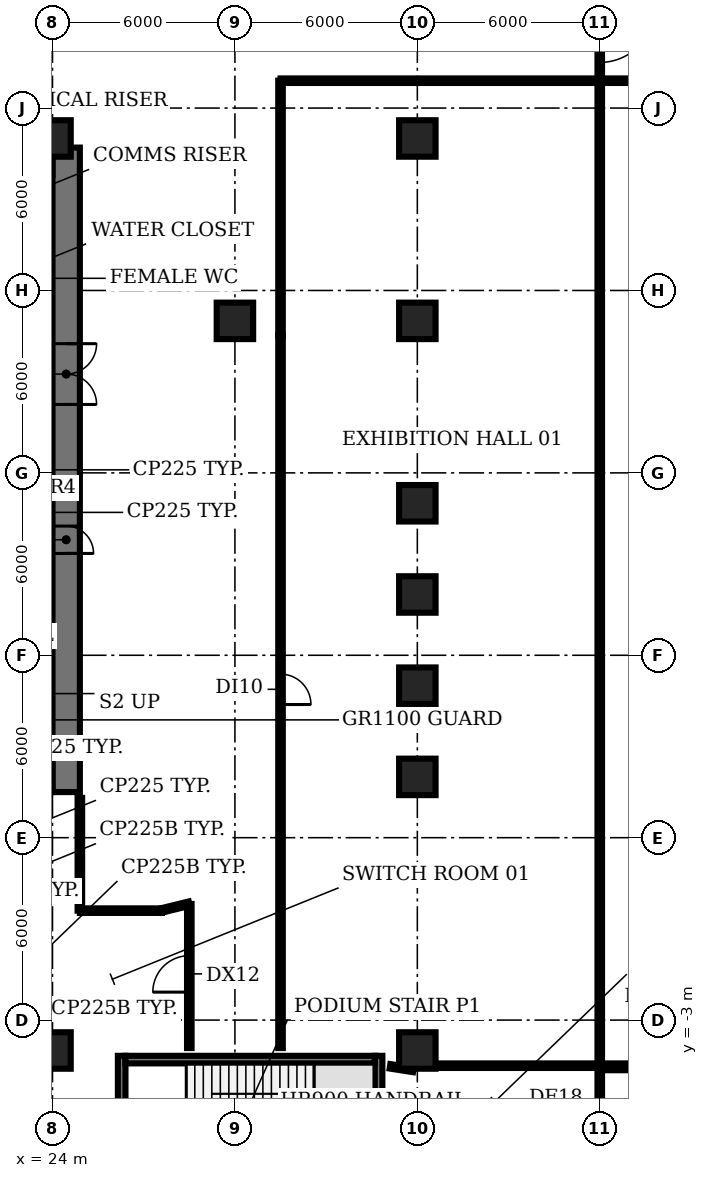
"""IFC4 building model, lengths in metres.
Left out: names, types, materials, properties, quantities, classifications, styles, units other than length and angle.
Written with IfcOpenShell. Run it as: python <this file> out.ifc"""

import sys

from ifc_helpers import new_model, si_unit, direction, frame, frame_2d, origin, origin_2d, place, context, subcontext, project, spatial, rectangle, extrude, element, fill, save


model = new_model("IFC4")
c1 = context("Model", 3, precision=1e-05, world=origin(), true_north=direction((0.0, 1.0)))
c2 = subcontext(c1, "Body", "Model", "MODEL_VIEW")
j1 = project(units=[si_unit("LENGTHUNIT", "METRE"), si_unit("PLANEANGLEUNIT", "RADIAN")], contexts=[c1])
p1 = place(None, origin())
s1 = spatial("IfcSite", under=j1, at=p1, CompositionType="ELEMENT")
p2 = place(p1, origin())
s2 = spatial("IfcBuilding", under=s1, at=p2, CompositionType="ELEMENT")
p3 = place(p2, origin())
s3 = spatial("IfcBuildingStorey", under=s2, at=p3, CompositionType="ELEMENT", Elevation=0.0)
for number, where, z_axis, x_axis in (
    (1, (24.0, -4.0, 0.0), (0.0, 0.0, 1.0), (1.0, 0.0, 0.0)),
    (2, (24.0, 26.0, 0.0), (0.0, 0.0, 1.0), (1.0, 0.0, 0.0)),
    (3, (30.0, 20.0, 0.0), (0.0, 0.0, 1.0), (1.0, 0.0, 0.0)),
    (4, (36.0, -4.0, 0.0), (0.0, 0.0, 1.0), (1.0, 0.0, 0.0)),
    (5, (36.0, 5.0, 0.0), (0.0, 0.0, 1.0), (1.0, 0.0, 0.0)),
    (6, (36.0, 8.0, 0.0), (0.0, 0.0, 1.0), (1.0, 0.0, 0.0)),
    (7, (36.0, 11.0, 0.0), (0.0, 0.0, 1.0), (1.0, 0.0, 0.0)),
    (8, (36.0, 14.0, 0.0), (0.0, 0.0, 1.0), (1.0, 0.0, 0.0)),
    (9, (36.0, 20.0, 0.0), (0.0, 0.0, 1.0), (1.0, 0.0, 0.0)),
    (10, (36.0, 26.0, 0.0), (0.0, 0.0, 1.0), (1.0, 0.0, 0.0)),
):
    element("IfcColumn", number, at=place(p3, frame(where, z_axis=z_axis, x_axis=x_axis)), inside=s3, PredefinedType="COLUMN", context=c2, shape_type="SweptSolid", body=[
        extrude(rectangle(XDim=1.2, YDim=1.2, at=origin_2d()), origin(), (0.0, 0.0, 1.0), 5.65),
    ])
p4 = place(p3, frame((20.85, 11.825, 0.0), z_axis=(0.0, 0.0, 1.0), x_axis=(1.0, 0.0, 0.0)))
e11 = element("IfcWall", 11, at=p4, inside=s3, PredefinedType="SHEAR", context=c2, shape_type="SweptSolid", body=[
    extrude(rectangle(XDim=3.15, YDim=0.25, at=frame_2d((1.575, 0.0))), origin(), (0.0, 0.0, 1.0), 5.65),
])
p5 = place(p3, frame((16.6, 13.7, 0.0), z_axis=(0.0, 0.0, 1.0), x_axis=(1.0, 0.0, 0.0)))
e12 = element("IfcWall", 12, at=p5, inside=s3, PredefinedType="PARTITIONING", context=c2, shape_type="SweptSolid", body=[
    extrude(rectangle(XDim=7.4, YDim=0.225, at=frame_2d((3.7, 0.0))), origin(), (0.0, 0.0, 1.0), 5.65),
])
p6 = place(p3, frame((9.4, 16.5, 0.0), z_axis=(0.0, 0.0, 1.0), x_axis=(1.0, 0.0, 0.0)))
e13 = element("IfcWall", 13, at=p6, inside=s3, PredefinedType="PARTITIONING", context=c2, shape_type="SweptSolid", body=[
    extrude(rectangle(XDim=14.6, YDim=0.225, at=frame_2d((7.3, 0.0))), origin(), (0.0, 0.0, 1.0), 5.65),
])
p7 = place(p6, frame((0.75, 0.0, 0.0)))
e14 = element("IfcOpeningElement", 14, at=p7, cuts=e13, PredefinedType="OPENING", context=c2, shape_type="SweptSolid", body=[
    extrude(rectangle(XDim=1.1, YDim=2.1, at=frame_2d((0.55, 1.05))), frame((0.0, 0.123, 0.0), z_axis=(0.0, -1.0, 0.0), x_axis=(1.0, 0.0, 0.0)), (0.0, 0.0, 1.0), 0.245),
])
p8 = place(p6, frame((3.55, 0.0, 0.0)))
e15 = element("IfcOpeningElement", 15, at=p8, cuts=e13, PredefinedType="OPENING", context=c2, shape_type="SweptSolid", body=[
    extrude(rectangle(XDim=1.1, YDim=2.1, at=frame_2d((0.55, 1.05))), frame((0.0, 0.123, 0.0), z_axis=(0.0, -1.0, 0.0), x_axis=(1.0, 0.0, 0.0)), (0.0, 0.0, 1.0), 0.245),
])
p9 = place(p6, frame((6.35, 0.0, 0.0)))
e16 = element("IfcOpeningElement", 16, at=p9, cuts=e13, PredefinedType="OPENING", context=c2, shape_type="SweptSolid", body=[
    extrude(rectangle(XDim=1.1, YDim=2.1, at=frame_2d((0.55, 1.05))), frame((0.0, 0.123, 0.0), z_axis=(0.0, -1.0, 0.0), x_axis=(1.0, 0.0, 0.0)), (0.0, 0.0, 1.0), 0.245),
])
p10 = place(p6, frame((9.15, 0.0, 0.0)))
e17 = element("IfcOpeningElement", 17, at=p10, cuts=e13, PredefinedType="OPENING", context=c2, shape_type="SweptSolid", body=[
    extrude(rectangle(XDim=1.1, YDim=2.1, at=frame_2d((0.55, 1.05))), frame((0.0, 0.123, 0.0), z_axis=(0.0, -1.0, 0.0), x_axis=(1.0, 0.0, 0.0)), (0.0, 0.0, 1.0), 0.245),
])
p11 = place(p6, frame((12.4, 0.0, 0.0)))
e18 = element("IfcOpeningElement", 18, at=p11, cuts=e13, PredefinedType="OPENING", context=c2, shape_type="SweptSolid", body=[
    extrude(rectangle(XDim=1.0, YDim=2.1, at=frame_2d((0.5, 1.05))), frame((0.0, 0.123, 0.0), z_axis=(0.0, -1.0, 0.0), x_axis=(1.0, 0.0, 0.0)), (0.0, 0.0, 1.0), 0.245),
])
p12 = place(p3, frame((24.0, 20.0, 0.0), z_axis=(0.0, 0.0, 1.0), x_axis=(-1.0, 0.0, 0.0)))
e19 = element("IfcWall", 19, at=p12, inside=s3, PredefinedType="PARTITIONING", context=c2, shape_type="SweptSolid", body=[
    extrude(rectangle(XDim=14.6, YDim=0.225, at=frame_2d((7.3, 0.0))), origin(), (0.0, 0.0, 1.0), 5.65),
])
p13 = place(p12, frame((11.35, 0.0, 0.0)))
e20 = element("IfcOpeningElement", 20, at=p13, cuts=e19, PredefinedType="OPENING", context=c2, shape_type="SweptSolid", body=[
    extrude(rectangle(XDim=1.0, YDim=2.1, at=frame_2d((0.5, 1.05))), frame((0.0, 0.123, 0.0), z_axis=(0.0, -1.0, 0.0), x_axis=(1.0, 0.0, 0.0)), (0.0, 0.0, 1.0), 0.245),
])
p14 = place(p12, frame((5.775, 0.0, 0.0)))
e21 = element("IfcOpeningElement", 21, at=p14, cuts=e19, PredefinedType="OPENING", context=c2, shape_type="SweptSolid", body=[
    extrude(rectangle(XDim=1.0, YDim=2.1, at=frame_2d((0.5, 1.05))), frame((0.0, 0.123, 0.0), z_axis=(0.0, -1.0, 0.0), x_axis=(1.0, 0.0, 0.0)), (0.0, 0.0, 1.0), 0.245),
])
p15 = place(p12, frame((1.2, 0.0, 0.0)))
e22 = element("IfcOpeningElement", 22, at=p15, cuts=e19, PredefinedType="OPENING", context=c2, shape_type="SweptSolid", body=[
    extrude(rectangle(XDim=1.0, YDim=2.1, at=frame_2d((0.5, 1.05))), frame((0.0, 0.123, 0.0), z_axis=(0.0, -1.0, 0.0), x_axis=(1.0, 0.0, 0.0)), (0.0, 0.0, 1.0), 0.245),
])
p16 = place(p3, frame((9.4, 22.8, 0.0), z_axis=(0.0, 0.0, 1.0), x_axis=(1.0, 0.0, 0.0)))
e23 = element("IfcWall", 23, at=p16, inside=s3, PredefinedType="PARTITIONING", context=c2, shape_type="SweptSolid", body=[
    extrude(rectangle(XDim=14.6, YDim=0.225, at=frame_2d((7.3, 0.0))), origin(), (0.0, 0.0, 1.0), 5.65),
])
p17 = place(p3, frame((24.45, 25.7, 0.0), z_axis=(0.0, 0.0, 1.0), x_axis=(0.0, -1.0, 0.0)))
e24 = element("IfcWall", 24, at=p17, inside=s3, PredefinedType="SHEAR", context=c2, shape_type="SweptSolid", body=[
    extrude(rectangle(XDim=21.2, YDim=0.9, at=frame_2d((10.6, 0.0))), origin(), (0.0, 0.0, 1.0), 5.65),
])
p18 = place(p17, frame((12.45, 0.0, 0.0)))
e25 = element("IfcOpeningElement", 25, at=p18, cuts=e24, PredefinedType="OPENING", context=c2, shape_type="SweptSolid", body=[
    extrude(rectangle(XDim=0.9, YDim=2.1, at=frame_2d((0.45, 1.05))), frame((0.0, 0.46, 0.0), z_axis=(0.0, -1.0, 0.0), x_axis=(1.0, 0.0, 0.0)), (0.0, 0.0, 1.0), 0.92),
])
p19 = place(p17, frame((6.45, 0.0, 0.0)))
e26 = element("IfcOpeningElement", 26, at=p19, cuts=e24, PredefinedType="OPENING", context=c2, shape_type="SweptSolid", body=[
    extrude(rectangle(XDim=2.0, YDim=2.1, at=frame_2d((1.0, 1.05))), frame((0.0, 0.46, 0.0), z_axis=(0.0, -1.0, 0.0), x_axis=(1.0, 0.0, 0.0)), (0.0, 0.0, 1.0), 0.92),
])
p20 = place(p3, frame((24.0, 4.95, 0.0), z_axis=(0.0, 0.0, 1.0), x_axis=(-1.0, 0.0, 0.0)))
e27 = element("IfcWall", 27, at=p20, inside=s3, PredefinedType="SHEAR", context=c2, shape_type="SweptSolid", body=[
    extrude(rectangle(XDim=18.0, YDim=0.9, at=frame_2d((9.0, 0.0))), origin(), (0.0, 0.0, 1.0), 5.65),
])
p21 = place(p20, frame((15.675, 0.0, 0.0)))
e28 = element("IfcOpeningElement", 28, at=p21, cuts=e27, PredefinedType="OPENING", context=c2, shape_type="SweptSolid", body=[
    extrude(rectangle(XDim=1.5, YDim=2.1, at=frame_2d((0.75, 1.05))), frame((0.0, 0.46, 0.0), z_axis=(0.0, -1.0, 0.0), x_axis=(1.0, 0.0, 0.0)), (0.0, 0.0, 1.0), 0.92),
])
p22 = place(p20, frame((0.825, 0.0, 0.0)))
e29 = element("IfcOpeningElement", 29, at=p22, cuts=e27, PredefinedType="OPENING", context=c2, shape_type="SweptSolid", body=[
    extrude(rectangle(XDim=1.5, YDim=2.1, at=frame_2d((0.75, 1.05))), frame((0.0, 0.46, 0.0), z_axis=(0.0, -1.0, 0.0), x_axis=(1.0, 0.0, 0.0)), (0.0, 0.0, 1.0), 0.92),
])
p23 = place(p20, frame((13.0, 0.0, 0.0)))
e30 = element("IfcOpeningElement", 30, at=p23, cuts=e27, PredefinedType="OPENING", context=c2, shape_type="SweptSolid", body=[
    extrude(rectangle(XDim=1.2, YDim=2.1, at=frame_2d((0.6, 1.05))), frame((0.0, 0.46, 0.0), z_axis=(0.0, -1.0, 0.0), x_axis=(1.0, 0.0, 0.0)), (0.0, 0.0, 1.0), 0.92),
])
p24 = place(p20, frame((4.9, 0.0, 0.0)))
e31 = element("IfcOpeningElement", 31, at=p24, cuts=e27, PredefinedType="OPENING", context=c2, shape_type="SweptSolid", body=[
    extrude(rectangle(XDim=1.0, YDim=2.1, at=frame_2d((0.5, 1.05))), frame((0.0, 0.46, 0.0), z_axis=(0.0, -1.0, 0.0), x_axis=(1.0, 0.0, 0.0)), (0.0, 0.0, 1.0), 0.92),
])
p25 = place(p3, frame((6.0, 25.25, 0.0), z_axis=(0.0, 0.0, 1.0), x_axis=(1.0, 0.0, 0.0)))
e32 = element("IfcWall", 32, at=p25, inside=s3, PredefinedType="SHEAR", context=c2, shape_type="SweptSolid", body=[
    extrude(rectangle(XDim=18.0, YDim=0.9, at=frame_2d((9.0, 0.0))), origin(), (0.0, 0.0, 1.0), 5.65),
])
for number, where, z_axis, x_axis in (
    (33, (26.275, -8.825, 0.0), (0.0, 0.0, 1.0), (0.0, 1.0, 0.0)),
    (34, (34.725, -8.825, 0.0), (0.0, 0.0, 1.0), (0.0, 1.0, 0.0)),
):
    element("IfcWall", number, at=place(p3, frame(where, z_axis=z_axis, x_axis=x_axis)), inside=s3, PredefinedType="SHEAR", context=c2, shape_type="SweptSolid", body=[
        extrude(rectangle(XDim=4.65, YDim=0.25, at=frame_2d((2.325, 0.0))), origin(), (0.0, 0.0, 1.0), 5.65),
    ])
p26 = place(p3, frame((26.4, -4.3, 0.0), z_axis=(0.0, 0.0, 1.0), x_axis=(1.0, 0.0, 0.0)))
e35 = element("IfcWall", 35, at=p26, inside=s3, PredefinedType="SHEAR", context=c2, shape_type="SweptSolid", body=[
    extrude(rectangle(XDim=8.2, YDim=0.25, at=frame_2d((4.1, 0.0))), origin(), (0.0, 0.0, 1.0), 5.65),
])
p27 = place(p3, frame((24.9, 0.6, 0.0), z_axis=(0.0, 0.0, 1.0), x_axis=(0.0, 1.0, 0.0)))
e36 = element("IfcWall", 36, at=p27, inside=s3, PredefinedType="PARTITIONING", context=c2, shape_type="SweptSolid", body=[
    extrude(rectangle(XDim=3.71, YDim=0.15, at=frame_2d((1.855, 0.0))), origin(), (0.0, 0.0, 1.0), 4.53),
])
p28 = place(p3, frame((24.9, 0.6, 0.0), z_axis=(0.0, 0.0, 1.0), x_axis=(1.0, 0.0, 0.0)))
e37 = element("IfcWall", 37, at=p28, inside=s3, PredefinedType="PARTITIONING", context=c2, shape_type="SweptSolid", body=[
    extrude(rectangle(XDim=2.7, YDim=0.15, at=frame_2d((1.35, 0.0))), origin(), (0.0, 0.0, 1.0), 4.53),
])
p29 = place(p3, frame((27.6, 0.61, 0.0), z_axis=(0.0, 0.0, 1.0), x_axis=(0.971400357327, 0.237447564284, 0.0)))
e38 = element("IfcWall", 38, at=p29, inside=s3, PredefinedType="PARTITIONING", context=c2, shape_type="SweptSolid", body=[
    extrude(rectangle(XDim=0.927, YDim=0.15, at=frame_2d((0.463, 0.0))), origin(), (0.0, 0.0, 1.0), 4.53),
])
p30 = place(p3, frame((28.5, -3.92, 0.0), z_axis=(0.0, 0.0, 1.0), x_axis=(0.0, 1.0, 0.0)))
e39 = element("IfcWall", 39, at=p30, inside=s3, PredefinedType="PARTITIONING", context=c2, shape_type="SweptSolid", body=[
    extrude(rectangle(XDim=4.74, YDim=0.15, at=frame_2d((2.37, 0.0))), origin(), (0.0, 0.0, 1.0), 4.53),
])
p31 = place(p30, frame((1.84, 0.0, 0.0)))
e40 = element("IfcOpeningElement", 40, at=p31, cuts=e39, PredefinedType="OPENING", context=c2, shape_type="SweptSolid", body=[
    extrude(rectangle(XDim=1.2, YDim=2.1, at=frame_2d((0.6, 1.05))), frame((0.0, 0.085, 0.0), z_axis=(0.0, -1.0, 0.0), x_axis=(1.0, 0.0, 0.0)), (0.0, 0.0, 1.0), 0.17),
])
p32 = place(p3, frame((31.5, 19.52, 0.0), z_axis=(0.0, 0.0, 1.0), x_axis=(0.0, -1.0, 0.0)))
e41 = element("IfcWall", 41, at=p32, inside=s3, PredefinedType="PARTITIONING", context=c2, shape_type="SweptSolid", body=[
    extrude(rectangle(XDim=23.44, YDim=0.15, at=frame_2d((11.72, 0.0))), origin(), (0.0, 0.0, 1.0), 4.53),
])
p33 = place(p32, frame((11.14, 0.0, 0.0)))
e42 = element("IfcOpeningElement", 42, at=p33, cuts=e41, PredefinedType="OPENING", context=c2, shape_type="SweptSolid", body=[
    extrude(rectangle(XDim=1.0, YDim=2.1, at=frame_2d((0.5, 1.05))), frame((0.0, 0.085, 0.0), z_axis=(0.0, -1.0, 0.0), x_axis=(1.0, 0.0, 0.0)), (0.0, 0.0, 1.0), 0.17),
])
p34 = place(p3, frame((31.5, 19.52, 0.0), z_axis=(0.0, 0.0, 1.0), x_axis=(0.0, 1.0, 0.0)))
e43 = element("IfcWall", 43, at=p34, inside=s3, PredefinedType="PARTITIONING", context=c2, shape_type="SweptSolid", body=[
    extrude(rectangle(XDim=8.38, YDim=0.15, at=frame_2d((4.19, 0.0))), origin(), (0.0, 0.0, 1.0), 4.53),
])
p35 = place(p3, frame((31.5, 27.9, 0.0), z_axis=(0.0, 0.0, 1.0), x_axis=(1.0, 0.0, 0.0)))
e44 = element("IfcWall", 44, at=p35, inside=s3, PredefinedType="PARTITIONING", context=c2, shape_type="SweptSolid", body=[
    extrude(rectangle(XDim=21.0, YDim=0.15, at=frame_2d((10.5, 0.0))), origin(), (0.0, 0.0, 1.0), 4.53),
])
p36 = place(p3, frame((35.1, -4.52, 0.0), z_axis=(0.0, 0.0, 1.0), x_axis=(0.988098486873, -0.153822560892, 0.0)))
e45 = element("IfcWall", 45, at=p36, inside=s3, PredefinedType="PARTITIONING", context=c2, shape_type="SweptSolid", body=[
    extrude(rectangle(XDim=0.779, YDim=0.15, at=frame_2d((0.39, 0.0))), origin(), (0.0, 0.0, 1.0), 4.53),
])
p37 = place(p3, frame((36.46, -4.5, 0.0), z_axis=(0.0, 0.0, 1.0), x_axis=(1.0, 0.0, 0.0)))
e46 = element("IfcWall", 46, at=p37, inside=s3, PredefinedType="PARTITIONING", context=c2, shape_type="SweptSolid", body=[
    extrude(rectangle(XDim=11.08, YDim=0.15, at=frame_2d((5.54, 0.0))), origin(), (0.0, 0.0, 1.0), 4.53),
])
p38 = place(p3, frame((42.0, -4.5, 0.0), z_axis=(0.0, 0.0, 1.0), x_axis=(0.0, -1.0, 0.0)))
e47 = element("IfcWall", 47, at=p38, inside=s3, PredefinedType="PARTITIONING", context=c2, shape_type="SweptSolid", body=[
    extrude(rectangle(XDim=2.2, YDim=0.15, at=frame_2d((1.1, 0.0))), origin(), (0.0, 0.0, 1.0), 4.53),
])
p39 = place(p38, frame((0.2, 0.0, 0.0)))
e48 = element("IfcOpeningElement", 48, at=p39, cuts=e47, PredefinedType="OPENING", context=c2, shape_type="SweptSolid", body=[
    extrude(rectangle(XDim=1.8, YDim=2.1, at=frame_2d((0.9, 1.05))), frame((0.0, 0.085, 0.0), z_axis=(0.0, -1.0, 0.0), x_axis=(1.0, 0.0, 0.0)), (0.0, 0.0, 1.0), 0.17),
])
p40 = place(p3, frame((42.0, -4.5, 0.0), z_axis=(0.0, 0.0, 1.0), x_axis=(0.0, 1.0, 0.0)))
e49 = element("IfcWall", 49, at=p40, inside=s3, PredefinedType="PARTITIONING", context=c2, shape_type="SweptSolid", body=[
    extrude(rectangle(XDim=32.4, YDim=0.15, at=frame_2d((16.2, 0.0))), origin(), (0.0, 0.0, 1.0), 4.53),
])
p41 = place(p3, frame((42.0, 30.9, 0.0), z_axis=(0.0, 0.0, 1.0), x_axis=(0.0, -1.0, 0.0)))
e50 = element("IfcWall", 50, at=p41, inside=s3, PredefinedType="PARTITIONING", context=c2, shape_type="SweptSolid", body=[
    extrude(rectangle(XDim=3.0, YDim=0.15, at=frame_2d((1.5, 0.0))), origin(), (0.0, 0.0, 1.0), 4.53),
])
p42 = place(p41, frame((0.6, 0.0, 0.0)))
e51 = element("IfcOpeningElement", 51, at=p42, cuts=e50, PredefinedType="OPENING", context=c2, shape_type="SweptSolid", body=[
    extrude(rectangle(XDim=1.8, YDim=2.1, at=frame_2d((0.9, 1.05))), frame((0.0, 0.085, 0.0), z_axis=(0.0, -1.0, 0.0), x_axis=(1.0, 0.0, 0.0)), (0.0, 0.0, 1.0), 0.17),
])
p43 = place(p18, origin())
e52 = element("IfcDoor", 52, at=p43, inside=s3, OperationType="SINGLE_SWING_RIGHT", PredefinedType="DOOR", context=c2, shape_type="SweptSolid", body=[
    extrude(rectangle(XDim=0.9, YDim=2.1, at=frame_2d((0.45, 1.05))), frame((0.0, -0.39, 0.0), z_axis=(0.0, -1.0, 0.0), x_axis=(1.0, 0.0, 0.0)), (0.0, 0.0, 1.0), 0.05),
])
fill(e25, e52)
p44 = place(p19, origin())
e53 = element("IfcDoor", 53, at=p44, inside=s3, OperationType="DOUBLE_DOOR_SINGLE_SWING", PredefinedType="DOOR", context=c2, shape_type="SweptSolid", body=[
    extrude(rectangle(XDim=2.0, YDim=2.1, at=frame_2d((1.0, 1.05))), frame((0.0, 0.025, 0.0), z_axis=(0.0, -1.0, 0.0), x_axis=(1.0, 0.0, 0.0)), (0.0, 0.0, 1.0), 0.05),
])
fill(e26, e53)
p45 = place(p31, origin())
e54 = element("IfcDoor", 54, at=p45, inside=s3, OperationType="SINGLE_SWING_LEFT", PredefinedType="DOOR", context=c2, shape_type="SweptSolid", body=[
    extrude(rectangle(XDim=1.2, YDim=2.1, at=frame_2d((0.6, 1.05))), frame((0.0, 0.025, 0.0), z_axis=(0.0, -1.0, 0.0), x_axis=(1.0, 0.0, 0.0)), (0.0, 0.0, 1.0), 0.05),
])
fill(e40, e54)
p46 = place(p33, origin())
e55 = element("IfcDoor", 55, at=p46, inside=s3, OperationType="SINGLE_SWING_RIGHT", PredefinedType="DOOR", context=c2, shape_type="SweptSolid", body=[
    extrude(rectangle(XDim=1.0, YDim=2.1, at=frame_2d((0.5, 1.05))), frame((0.0, 0.025, 0.0), z_axis=(0.0, -1.0, 0.0), x_axis=(1.0, 0.0, 0.0)), (0.0, 0.0, 1.0), 0.05),
])
fill(e42, e55)
p47 = place(p39, origin())
e56 = element("IfcDoor", 56, at=p47, inside=s3, OperationType="SINGLE_SWING_LEFT", PredefinedType="DOOR", context=c2, shape_type="SweptSolid", body=[
    extrude(rectangle(XDim=1.8, YDim=2.1, at=frame_2d((0.9, 1.05))), frame((0.0, 0.025, 0.0), z_axis=(0.0, -1.0, 0.0), x_axis=(1.0, 0.0, 0.0)), (0.0, 0.0, 1.0), 0.05),
])
fill(e48, e56)
p48 = place(p42, origin())
e57 = element("IfcDoor", 57, at=p48, inside=s3, OperationType="SINGLE_SWING_LEFT", PredefinedType="DOOR", context=c2, shape_type="SweptSolid", body=[
    extrude(rectangle(XDim=1.8, YDim=2.1, at=frame_2d((0.9, 1.05))), frame((0.0, 0.025, 0.0), z_axis=(0.0, -1.0, 0.0), x_axis=(1.0, 0.0, 0.0)), (0.0, 0.0, 1.0), 0.05),
])
fill(e51, e57)
save(model, sys.argv[1])
